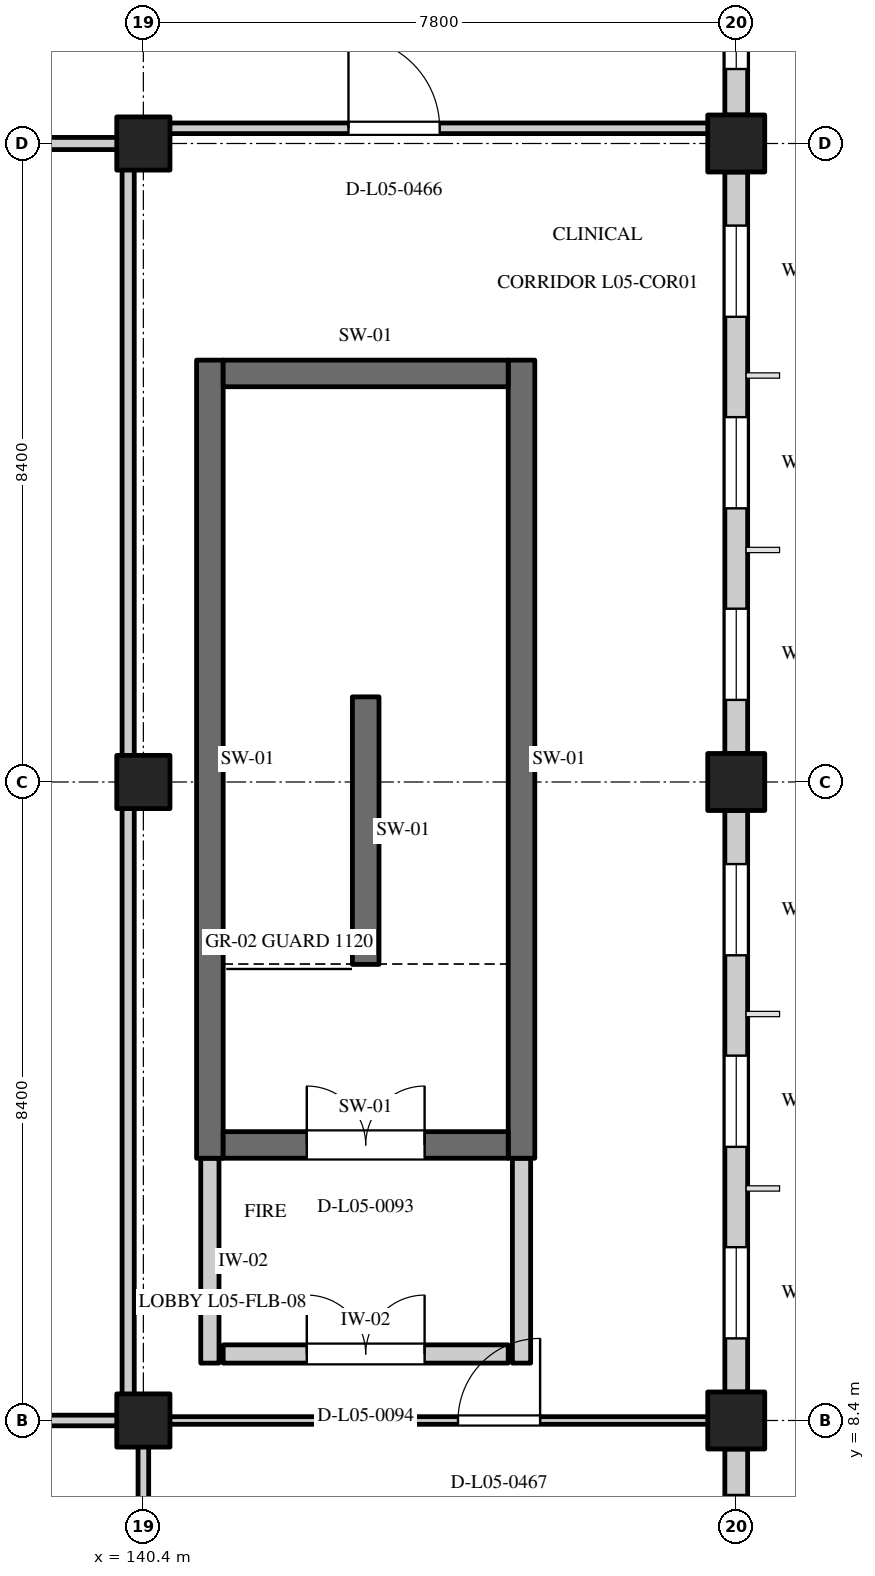
"""IFC4 building model, lengths in metres.
Left out: names, types, materials, properties, quantities, classifications, styles, units other than length and angle.
Written with IfcOpenShell. Run it as: python <this file> out.ifc"""

import sys

from ifc_helpers import new_model, si_unit, direction, frame, frame_2d, origin, origin_2d, place, context, subcontext, project, spatial, rectangle, extrude, element, fill, save


model = new_model("IFC4")
c1 = context("Model", 3, precision=1e-05, world=origin(), true_north=direction((0.0, 1.0)))
c2 = subcontext(c1, "Body", "Model", "MODEL_VIEW")
j1 = project(units=[si_unit("LENGTHUNIT", "METRE"), si_unit("PLANEANGLEUNIT", "RADIAN")], contexts=[c1])
p1 = place(None, origin())
s1 = spatial("IfcSite", under=j1, at=p1, CompositionType="ELEMENT")
p2 = place(p1, origin())
s2 = spatial("IfcBuilding", under=s1, at=p2, CompositionType="ELEMENT")
p3 = place(p2, frame((0.0, 0.0, 22.2)))
s3 = spatial("IfcBuildingStorey", under=s2, at=p3, CompositionType="ELEMENT", Elevation=22.2)
for number, where, z_axis, x_axis in (
    (1, (140.4, 8.4, 0.0), (0.0, 0.0, 1.0), (1.0, 0.0, 0.0)),
    (2, (140.4, 16.8, 0.0), (0.0, 0.0, 1.0), (1.0, 0.0, 0.0)),
    (3, (140.4, 25.2, 0.0), (0.0, 0.0, 1.0), (1.0, 0.0, 0.0)),
):
    element("IfcColumn", number, at=place(p3, frame(where, z_axis=z_axis, x_axis=x_axis)), inside=s3, PredefinedType="COLUMN", context=c2, shape_type="SweptSolid", body=[
        extrude(rectangle(XDim=0.7, YDim=0.7, at=origin_2d()), origin(), (0.0, 0.0, 1.0), 3.9),
    ])
for number, where, z_axis, x_axis in (
    (4, (148.2, 8.4, 0.0), (0.0, 0.0, 1.0), (1.0, 0.0, 0.0)),
    (5, (148.2, 16.8, 0.0), (0.0, 0.0, 1.0), (1.0, 0.0, 0.0)),
    (6, (148.2, 25.2, 0.0), (0.0, 0.0, 1.0), (1.0, 0.0, 0.0)),
):
    element("IfcColumn", number, at=place(p3, frame(where, z_axis=z_axis, x_axis=x_axis)), inside=s3, PredefinedType="COLUMN", context=c2, shape_type="SweptSolid", body=[
        extrude(rectangle(XDim=0.75, YDim=0.75, at=origin_2d()), origin(), (0.0, 0.0, 1.0), 3.9),
    ])
p4 = place(p3, frame((148.2, 0.375, 0.0), z_axis=(0.0, 0.0, 1.0), x_axis=(0.0, 1.0, 0.0)))
e7 = element("IfcWall", 7, at=p4, inside=s3, PredefinedType="STANDARD", context=c2, shape_type="SweptSolid", body=[
    extrude(rectangle(XDim=7.65, YDim=0.3, at=frame_2d((3.825, 0.0))), origin(), (0.0, 0.0, 1.0), 2.95),
])
p5 = place(p4, frame((0.605, 0.0, 0.8)))
e8 = element("IfcOpeningElement", 8, at=p5, cuts=e7, PredefinedType="OPENING", context=c2, shape_type="SweptSolid", body=[
    extrude(rectangle(XDim=1.4, YDim=1.45, at=frame_2d((0.7, 0.725))), frame((0.0, 0.162, 0.0), z_axis=(0.0, -1.0, 0.0), x_axis=(1.0, 0.0, 0.0)), (0.0, 0.0, 1.0), 0.324),
])
p6 = place(p4, frame((3.125, 0.0, 0.8)))
e9 = element("IfcOpeningElement", 9, at=p6, cuts=e7, PredefinedType="OPENING", context=c2, shape_type="SweptSolid", body=[
    extrude(rectangle(XDim=1.4, YDim=1.45, at=frame_2d((0.7, 0.725))), frame((0.0, 0.162, 0.0), z_axis=(0.0, -1.0, 0.0), x_axis=(1.0, 0.0, 0.0)), (0.0, 0.0, 1.0), 0.324),
])
p7 = place(p4, frame((5.645, 0.0, 0.8)))
e10 = element("IfcOpeningElement", 10, at=p7, cuts=e7, PredefinedType="OPENING", context=c2, shape_type="SweptSolid", body=[
    extrude(rectangle(XDim=1.4, YDim=1.45, at=frame_2d((0.7, 0.725))), frame((0.0, 0.162, 0.0), z_axis=(0.0, -1.0, 0.0), x_axis=(1.0, 0.0, 0.0)), (0.0, 0.0, 1.0), 0.324),
])
p8 = place(p3, frame((148.2, 8.775, 0.0), z_axis=(0.0, 0.0, 1.0), x_axis=(0.0, 1.0, 0.0)))
e11 = element("IfcWall", 11, at=p8, inside=s3, PredefinedType="STANDARD", context=c2, shape_type="SweptSolid", body=[
    extrude(rectangle(XDim=7.65, YDim=0.3, at=frame_2d((3.825, 0.0))), origin(), (0.0, 0.0, 1.0), 2.95),
])
p9 = place(p8, frame((0.705, 0.0, 0.8)))
e12 = element("IfcOpeningElement", 12, at=p9, cuts=e11, PredefinedType="OPENING", context=c2, shape_type="SweptSolid", body=[
    extrude(rectangle(XDim=1.2, YDim=1.55, at=frame_2d((0.6, 0.775))), frame((0.0, 0.162, 0.0), z_axis=(0.0, -1.0, 0.0), x_axis=(1.0, 0.0, 0.0)), (0.0, 0.0, 1.0), 0.324),
])
p10 = place(p8, frame((3.225, 0.0, 0.8)))
e13 = element("IfcOpeningElement", 13, at=p10, cuts=e11, PredefinedType="OPENING", context=c2, shape_type="SweptSolid", body=[
    extrude(rectangle(XDim=1.2, YDim=1.55, at=frame_2d((0.6, 0.775))), frame((0.0, 0.162, 0.0), z_axis=(0.0, -1.0, 0.0), x_axis=(1.0, 0.0, 0.0)), (0.0, 0.0, 1.0), 0.324),
])
p11 = place(p8, frame((5.745, 0.0, 0.8)))
e14 = element("IfcOpeningElement", 14, at=p11, cuts=e11, PredefinedType="OPENING", context=c2, shape_type="SweptSolid", body=[
    extrude(rectangle(XDim=1.2, YDim=1.55, at=frame_2d((0.6, 0.775))), frame((0.0, 0.162, 0.0), z_axis=(0.0, -1.0, 0.0), x_axis=(1.0, 0.0, 0.0)), (0.0, 0.0, 1.0), 0.324),
])
p12 = place(p3, frame((148.2, 17.175, 0.0), z_axis=(0.0, 0.0, 1.0), x_axis=(0.0, 1.0, 0.0)))
e15 = element("IfcWall", 15, at=p12, inside=s3, PredefinedType="STANDARD", context=c2, shape_type="SweptSolid", body=[
    extrude(rectangle(XDim=7.65, YDim=0.3, at=frame_2d((3.825, 0.0))), origin(), (0.0, 0.0, 1.0), 2.95),
])
p13 = place(p12, frame((0.705, 0.0, 0.8)))
e16 = element("IfcOpeningElement", 16, at=p13, cuts=e15, PredefinedType="OPENING", context=c2, shape_type="SweptSolid", body=[
    extrude(rectangle(XDim=1.2, YDim=1.4, at=frame_2d((0.6, 0.7))), frame((0.0, 0.162, 0.0), z_axis=(0.0, -1.0, 0.0), x_axis=(1.0, 0.0, 0.0)), (0.0, 0.0, 1.0), 0.324),
])
p14 = place(p12, frame((3.225, 0.0, 0.8)))
e17 = element("IfcOpeningElement", 17, at=p14, cuts=e15, PredefinedType="OPENING", context=c2, shape_type="SweptSolid", body=[
    extrude(rectangle(XDim=1.2, YDim=1.4, at=frame_2d((0.6, 0.7))), frame((0.0, 0.162, 0.0), z_axis=(0.0, -1.0, 0.0), x_axis=(1.0, 0.0, 0.0)), (0.0, 0.0, 1.0), 0.324),
])
p15 = place(p12, frame((5.745, 0.0, 0.8)))
e18 = element("IfcOpeningElement", 18, at=p15, cuts=e15, PredefinedType="OPENING", context=c2, shape_type="SweptSolid", body=[
    extrude(rectangle(XDim=1.2, YDim=1.4, at=frame_2d((0.6, 0.7))), frame((0.0, 0.162, 0.0), z_axis=(0.0, -1.0, 0.0), x_axis=(1.0, 0.0, 0.0)), (0.0, 0.0, 1.0), 0.324),
])
p16 = place(p3, frame((148.2, 25.575, 0.0), z_axis=(0.0, 0.0, 1.0), x_axis=(0.0, 1.0, 0.0)))
e19 = element("IfcWall", 19, at=p16, inside=s3, PredefinedType="STANDARD", context=c2, shape_type="SweptSolid", body=[
    extrude(rectangle(XDim=7.65, YDim=0.3, at=frame_2d((3.825, 0.0))), origin(), (0.0, 0.0, 1.0), 2.95),
])
p17 = place(p16, frame((0.605, 0.0, 0.8)))
e20 = element("IfcOpeningElement", 20, at=p17, cuts=e19, PredefinedType="OPENING", context=c2, shape_type="SweptSolid", body=[
    extrude(rectangle(XDim=1.4, YDim=1.6, at=frame_2d((0.7, 0.8))), frame((0.0, 0.162, 0.0), z_axis=(0.0, -1.0, 0.0), x_axis=(1.0, 0.0, 0.0)), (0.0, 0.0, 1.0), 0.324),
])
p18 = place(p16, frame((3.125, 0.0, 0.8)))
e21 = element("IfcOpeningElement", 21, at=p18, cuts=e19, PredefinedType="OPENING", context=c2, shape_type="SweptSolid", body=[
    extrude(rectangle(XDim=1.4, YDim=1.6, at=frame_2d((0.7, 0.8))), frame((0.0, 0.162, 0.0), z_axis=(0.0, -1.0, 0.0), x_axis=(1.0, 0.0, 0.0)), (0.0, 0.0, 1.0), 0.324),
])
p19 = place(p16, frame((5.645, 0.0, 0.8)))
e22 = element("IfcOpeningElement", 22, at=p19, cuts=e19, PredefinedType="OPENING", context=c2, shape_type="SweptSolid", body=[
    extrude(rectangle(XDim=1.4, YDim=1.6, at=frame_2d((0.7, 0.8))), frame((0.0, 0.162, 0.0), z_axis=(0.0, -1.0, 0.0), x_axis=(1.0, 0.0, 0.0)), (0.0, 0.0, 1.0), 0.324),
])
for number, where, z_axis, x_axis in (
    (23, (141.275, 11.85, 0.0), (0.0, 0.0, 1.0), (0.0, 1.0, 0.0)),
    (24, (145.375, 11.85, 0.0), (0.0, 0.0, 1.0), (0.0, 1.0, 0.0)),
):
    element("IfcWall", number, at=place(p3, frame(where, z_axis=z_axis, x_axis=x_axis)), inside=s3, PredefinedType="SHEAR", context=c2, shape_type="SweptSolid", body=[
        extrude(rectangle(XDim=10.5, YDim=0.35, at=frame_2d((5.25, 0.0))), origin(), (0.0, 0.0, 1.0), 3.6),
    ])
p20 = place(p3, frame((141.45, 22.175, 0.0), z_axis=(0.0, 0.0, 1.0), x_axis=(1.0, 0.0, 0.0)))
e25 = element("IfcWall", 25, at=p20, inside=s3, PredefinedType="SHEAR", context=c2, shape_type="SweptSolid", body=[
    extrude(rectangle(XDim=3.75, YDim=0.35, at=frame_2d((1.875, 0.0))), origin(), (0.0, 0.0, 1.0), 3.6),
])
p21 = place(p3, frame((141.45, 12.025, 0.0), z_axis=(0.0, 0.0, 1.0), x_axis=(1.0, 0.0, 0.0)))
e26 = element("IfcWall", 26, at=p21, inside=s3, PredefinedType="SHEAR", context=c2, shape_type="SweptSolid", body=[
    extrude(rectangle(XDim=3.75, YDim=0.35, at=frame_2d((1.875, 0.0))), origin(), (0.0, 0.0, 1.0), 3.6),
])
p22 = place(p21, frame((1.1, 0.0, 0.0)))
e27 = element("IfcOpeningElement", 27, at=p22, cuts=e26, PredefinedType="OPENING", context=c2, shape_type="SweptSolid", body=[
    extrude(rectangle(XDim=1.55, YDim=2.25, at=frame_2d((0.775, 1.125))), frame((0.0, 0.187, 0.0), z_axis=(0.0, -1.0, 0.0), x_axis=(1.0, 0.0, 0.0)), (0.0, 0.0, 1.0), 0.374),
])
for number, where, z_axis, x_axis in (
    (28, (141.275, 9.155, 0.0), (0.0, 0.0, 1.0), (0.0, 1.0, 0.0)),
    (29, (145.375, 9.155, 0.0), (0.0, 0.0, 1.0), (0.0, 1.0, 0.0)),
):
    element("IfcWall", number, at=place(p3, frame(where, z_axis=z_axis, x_axis=x_axis)), inside=s3, PredefinedType="STANDARD", context=c2, shape_type="SweptSolid", body=[
        extrude(rectangle(XDim=2.695, YDim=0.24, at=frame_2d((1.348, 0.0))), origin(), (0.0, 0.0, 1.0), 3.6),
    ])
p23 = place(p3, frame((141.45, 9.275, 0.0), z_axis=(0.0, 0.0, 1.0), x_axis=(1.0, 0.0, 0.0)))
e30 = element("IfcWall", 30, at=p23, inside=s3, PredefinedType="STANDARD", context=c2, shape_type="SweptSolid", body=[
    extrude(rectangle(XDim=3.75, YDim=0.24, at=frame_2d((1.875, 0.0))), origin(), (0.0, 0.0, 1.0), 3.6),
])
p24 = place(p23, frame((1.1, 0.0, 0.0)))
e31 = element("IfcOpeningElement", 31, at=p24, cuts=e30, PredefinedType="OPENING", context=c2, shape_type="SweptSolid", body=[
    extrude(rectangle(XDim=1.55, YDim=2.25, at=frame_2d((0.775, 1.125))), frame((0.0, 0.132, 0.0), z_axis=(0.0, -1.0, 0.0), x_axis=(1.0, 0.0, 0.0)), (0.0, 0.0, 1.0), 0.264),
])
p25 = place(p3, frame((143.325, 14.4, 0.0), z_axis=(0.0, 0.0, 1.0), x_axis=(0.0, 1.0, 0.0)))
e32 = element("IfcWall", 32, at=p25, inside=s3, PredefinedType="SHEAR", context=c2, shape_type="SweptSolid", body=[
    extrude(rectangle(XDim=3.52, YDim=0.35, at=frame_2d((1.76, 0.0))), origin(), (0.0, 0.0, 1.0), 3.6),
])
p26 = place(p3, frame((132.29, 8.4, 0.0), z_axis=(0.0, 0.0, 1.0), x_axis=(1.0, 0.0, 0.0)))
e33 = element("IfcWall", 33, at=p26, inside=s3, PredefinedType="PARTITIONING", context=c2, shape_type="SweptSolid", body=[
    extrude(rectangle(XDim=8.025, YDim=0.14, at=frame_2d((4.012, 0.0))), origin(), (0.0, 0.0, 1.0), 3.58),
])
p27 = place(p26, frame((2.341, 0.0, 0.0)))
e34 = element("IfcOpeningElement", 34, at=p27, cuts=e33, PredefinedType="OPENING", context=c2, shape_type="SweptSolid", body=[
    extrude(rectangle(XDim=1.95, YDim=2.35, at=frame_2d((0.975, 1.175))), frame((0.0, 0.082, 0.0), z_axis=(0.0, -1.0, 0.0), x_axis=(1.0, 0.0, 0.0)), (0.0, 0.0, 1.0), 0.164),
])
p28 = place(p3, frame((140.4, 0.085, 0.0), z_axis=(0.0, 0.0, 1.0), x_axis=(0.0, 1.0, 0.0)))
e35 = element("IfcWall", 35, at=p28, inside=s3, PredefinedType="PARTITIONING", context=c2, shape_type="SweptSolid", body=[
    extrude(rectangle(XDim=8.23, YDim=0.14, at=frame_2d((4.115, 0.0))), origin(), (0.0, 0.0, 1.0), 3.58),
])
p29 = place(p3, frame((132.685, 25.2, 0.0), z_axis=(0.0, 0.0, 1.0), x_axis=(1.0, 0.0, 0.0)))
e36 = element("IfcWall", 36, at=p29, inside=s3, PredefinedType="PARTITIONING", context=c2, shape_type="SweptSolid", body=[
    extrude(rectangle(XDim=7.43, YDim=0.16, at=frame_2d((3.715, 0.0))), origin(), (0.0, 0.0, 1.0), 2.95),
])
p30 = place(p29, frame((2.63, 0.0, 0.0)))
e37 = element("IfcOpeningElement", 37, at=p30, cuts=e36, PredefinedType="OPENING", context=c2, shape_type="SweptSolid", body=[
    extrude(rectangle(XDim=1.15, YDim=2.15, at=frame_2d((0.575, 1.075))), frame((0.0, 0.092, 0.0), z_axis=(0.0, -1.0, 0.0), x_axis=(1.0, 0.0, 0.0)), (0.0, 0.0, 1.0), 0.184),
])
p31 = place(p3, frame((140.2, 8.485, 0.0), z_axis=(0.0, 0.0, 1.0), x_axis=(0.0, 1.0, 0.0)))
e38 = element("IfcWall", 38, at=p31, inside=s3, PredefinedType="PARTITIONING", context=c2, shape_type="SweptSolid", body=[
    extrude(rectangle(XDim=16.63, YDim=0.16, at=frame_2d((8.315, 0.0))), origin(), (0.0, 0.0, 1.0), 3.58),
])
p32 = place(p3, frame((140.155, 25.4, 0.0), z_axis=(0.0, 0.0, 1.0), x_axis=(1.0, 0.0, 0.0)))
e39 = element("IfcWall", 39, at=p32, inside=s3, PredefinedType="PARTITIONING", context=c2, shape_type="SweptSolid", body=[
    extrude(rectangle(XDim=7.76, YDim=0.14, at=frame_2d((3.88, 0.0))), origin(), (0.0, 0.0, 1.0), 2.95),
])
p33 = place(p32, frame((2.943, 0.0, 0.0)))
e40 = element("IfcOpeningElement", 40, at=p33, cuts=e39, PredefinedType="OPENING", context=c2, shape_type="SweptSolid", body=[
    extrude(rectangle(XDim=1.2, YDim=2.15, at=frame_2d((0.6, 1.075))), frame((0.0, 0.082, 0.0), z_axis=(0.0, -1.0, 0.0), x_axis=(1.0, 0.0, 0.0)), (0.0, 0.0, 1.0), 0.164),
])
p34 = place(p3, frame((140.485, 8.4, 0.0), z_axis=(0.0, 0.0, 1.0), x_axis=(1.0, 0.0, 0.0)))
e41 = element("IfcWall", 41, at=p34, inside=s3, PredefinedType="PARTITIONING", context=c2, shape_type="SweptSolid", body=[
    extrude(rectangle(XDim=7.43, YDim=0.1, at=frame_2d((3.715, 0.0))), origin(), (0.0, 0.0, 1.0), 3.58),
])
p35 = place(p34, frame((4.055, 0.0, 0.0)))
e42 = element("IfcOpeningElement", 42, at=p35, cuts=e41, PredefinedType="OPENING", context=c2, shape_type="SweptSolid", body=[
    extrude(rectangle(XDim=1.08, YDim=2.15, at=frame_2d((0.54, 1.075))), frame((0.0, 0.062, 0.0), z_axis=(0.0, -1.0, 0.0), x_axis=(1.0, 0.0, 0.0)), (0.0, 0.0, 1.0), 0.124),
])
p36 = place(p7, origin())
e43 = element("IfcWindow", 43, at=p36, inside=s3, PartitioningType="SINGLE_PANEL", PredefinedType="WINDOW", context=c2, shape_type="SweptSolid", body=[
    extrude(rectangle(XDim=1.4, YDim=1.45, at=frame_2d((0.7, 0.725))), frame((0.0, 0.03, 0.0), z_axis=(0.0, -1.0, 0.0), x_axis=(1.0, 0.0, 0.0)), (0.0, 0.0, 1.0), 0.06),
])
fill(e10, e43)
p37 = place(p9, origin())
e44 = element("IfcWindow", 44, at=p37, inside=s3, PartitioningType="SINGLE_PANEL", PredefinedType="WINDOW", context=c2, shape_type="SweptSolid", body=[
    extrude(rectangle(XDim=1.2, YDim=1.55, at=frame_2d((0.6, 0.775))), frame((0.0, 0.03, 0.0), z_axis=(0.0, -1.0, 0.0), x_axis=(1.0, 0.0, 0.0)), (0.0, 0.0, 1.0), 0.06),
])
fill(e12, e44)
p38 = place(p10, origin())
e45 = element("IfcWindow", 45, at=p38, inside=s3, PartitioningType="SINGLE_PANEL", PredefinedType="WINDOW", context=c2, shape_type="SweptSolid", body=[
    extrude(rectangle(XDim=1.2, YDim=1.55, at=frame_2d((0.6, 0.775))), frame((0.0, 0.03, 0.0), z_axis=(0.0, -1.0, 0.0), x_axis=(1.0, 0.0, 0.0)), (0.0, 0.0, 1.0), 0.06),
])
fill(e13, e45)
p39 = place(p11, origin())
e46 = element("IfcWindow", 46, at=p39, inside=s3, PartitioningType="SINGLE_PANEL", PredefinedType="WINDOW", context=c2, shape_type="SweptSolid", body=[
    extrude(rectangle(XDim=1.2, YDim=1.55, at=frame_2d((0.6, 0.775))), frame((0.0, 0.03, 0.0), z_axis=(0.0, -1.0, 0.0), x_axis=(1.0, 0.0, 0.0)), (0.0, 0.0, 1.0), 0.06),
])
fill(e14, e46)
p40 = place(p13, origin())
e47 = element("IfcWindow", 47, at=p40, inside=s3, PartitioningType="SINGLE_PANEL", PredefinedType="WINDOW", context=c2, shape_type="SweptSolid", body=[
    extrude(rectangle(XDim=1.2, YDim=1.4, at=frame_2d((0.6, 0.7))), frame((0.0, 0.03, 0.0), z_axis=(0.0, -1.0, 0.0), x_axis=(1.0, 0.0, 0.0)), (0.0, 0.0, 1.0), 0.06),
])
fill(e16, e47)
p41 = place(p14, origin())
e48 = element("IfcWindow", 48, at=p41, inside=s3, PartitioningType="SINGLE_PANEL", PredefinedType="WINDOW", context=c2, shape_type="SweptSolid", body=[
    extrude(rectangle(XDim=1.2, YDim=1.4, at=frame_2d((0.6, 0.7))), frame((0.0, 0.03, 0.0), z_axis=(0.0, -1.0, 0.0), x_axis=(1.0, 0.0, 0.0)), (0.0, 0.0, 1.0), 0.06),
])
fill(e17, e48)
p42 = place(p15, origin())
e49 = element("IfcWindow", 49, at=p42, inside=s3, PartitioningType="SINGLE_PANEL", PredefinedType="WINDOW", context=c2, shape_type="SweptSolid", body=[
    extrude(rectangle(XDim=1.2, YDim=1.4, at=frame_2d((0.6, 0.7))), frame((0.0, 0.03, 0.0), z_axis=(0.0, -1.0, 0.0), x_axis=(1.0, 0.0, 0.0)), (0.0, 0.0, 1.0), 0.06),
])
fill(e18, e49)
p43 = place(p17, origin())
e50 = element("IfcWindow", 50, at=p43, inside=s3, PartitioningType="SINGLE_PANEL", PredefinedType="WINDOW", context=c2, shape_type="SweptSolid", body=[
    extrude(rectangle(XDim=1.4, YDim=1.6, at=frame_2d((0.7, 0.8))), frame((0.0, 0.03, 0.0), z_axis=(0.0, -1.0, 0.0), x_axis=(1.0, 0.0, 0.0)), (0.0, 0.0, 1.0), 0.06),
])
fill(e20, e50)
p44 = place(p22, origin())
e51 = element("IfcDoor", 51, at=p44, inside=s3, OperationType="DOUBLE_DOOR_SINGLE_SWING", PredefinedType="DOOR", context=c2, shape_type="SweptSolid", body=[
    extrude(rectangle(XDim=1.55, YDim=2.25, at=frame_2d((0.775, 1.125))), frame((0.0, 0.025, 0.0), z_axis=(0.0, -1.0, 0.0), x_axis=(1.0, 0.0, 0.0)), (0.0, 0.0, 1.0), 0.05),
])
fill(e27, e51)
p45 = place(p24, origin())
e52 = element("IfcDoor", 52, at=p45, inside=s3, OperationType="DOUBLE_DOOR_SINGLE_SWING", PredefinedType="DOOR", context=c2, shape_type="SweptSolid", body=[
    extrude(rectangle(XDim=1.55, YDim=2.25, at=frame_2d((0.775, 1.125))), frame((0.0, 0.025, 0.0), z_axis=(0.0, -1.0, 0.0), x_axis=(1.0, 0.0, 0.0)), (0.0, 0.0, 1.0), 0.05),
])
fill(e31, e52)
p46 = place(p33, origin())
e53 = element("IfcDoor", 53, at=p46, inside=s3, OperationType="SINGLE_SWING_LEFT", PredefinedType="DOOR", context=c2, shape_type="SweptSolid", body=[
    extrude(rectangle(XDim=1.2, YDim=2.15, at=frame_2d((0.6, 1.075))), frame((0.0, 0.025, 0.0), z_axis=(0.0, -1.0, 0.0), x_axis=(1.0, 0.0, 0.0)), (0.0, 0.0, 1.0), 0.05),
])
fill(e40, e53)
p47 = place(p35, frame((1.08, 0.0, 0.0), z_axis=(0.0, 0.0, 1.0), x_axis=(-1.0, 0.0, 0.0)))
e54 = element("IfcDoor", 54, at=p47, inside=s3, OperationType="SINGLE_SWING_LEFT", PredefinedType="DOOR", context=c2, shape_type="SweptSolid", body=[
    extrude(rectangle(XDim=1.08, YDim=2.15, at=frame_2d((0.54, 1.075))), frame((0.0, 0.025, 0.0), z_axis=(0.0, -1.0, 0.0), x_axis=(1.0, 0.0, 0.0)), (0.0, 0.0, 1.0), 0.05),
])
fill(e42, e54)
save(model, sys.argv[1])
